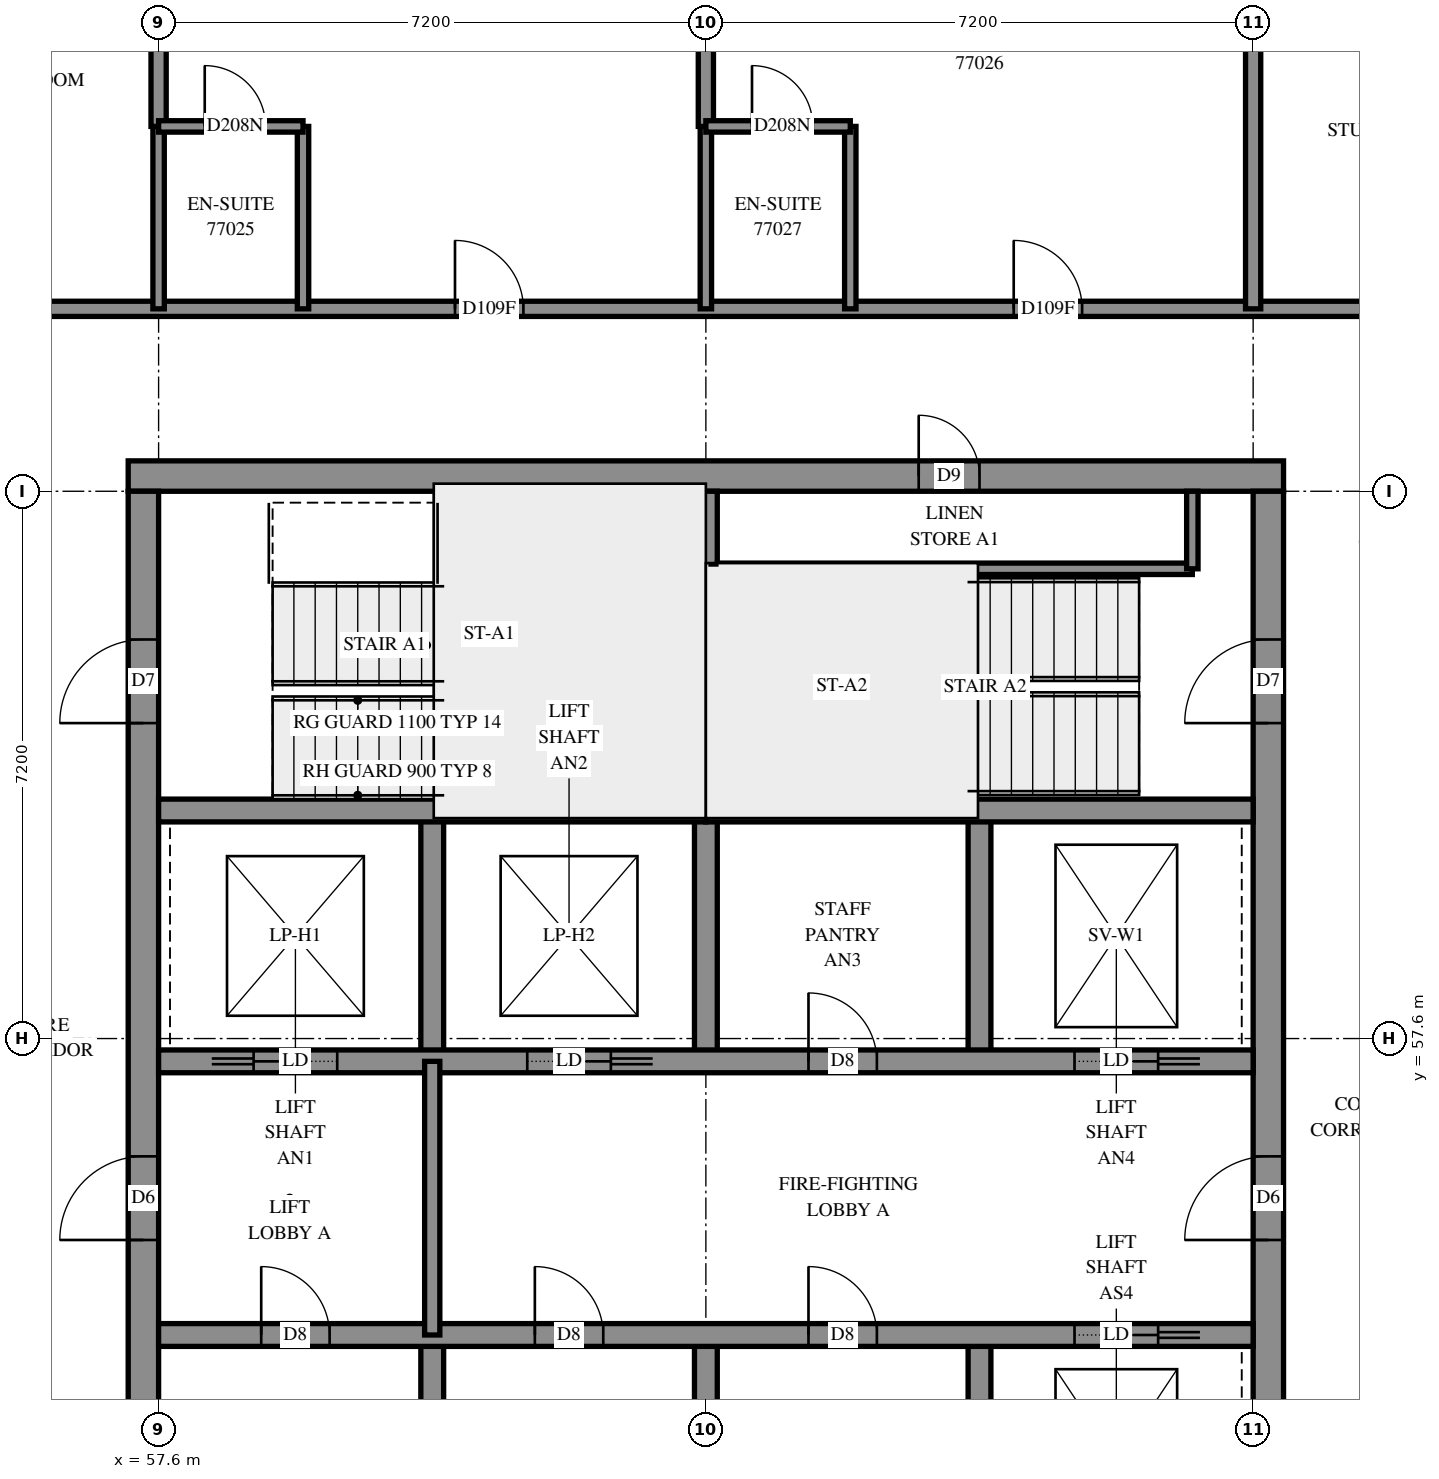
"""IFC4 building model, lengths in metres.
Left out: names, types, materials, properties, quantities, classifications, styles, units other than length and angle.
Written with IfcOpenShell. Run it as: python <this file> out.ifc"""

import sys

from ifc_helpers import new_model, si_unit, direction, frame, frame_2d, origin, place, context, subcontext, project, spatial, rectangle, extrude, element, fill, save


model = new_model("IFC4")
c1 = context("Model", 3, precision=1e-05, world=origin(), true_north=direction((0.0, 1.0)))
c2 = subcontext(c1, "Body", "Model", "MODEL_VIEW")
j1 = project(units=[si_unit("LENGTHUNIT", "METRE"), si_unit("PLANEANGLEUNIT", "RADIAN")], contexts=[c1])
p1 = place(None, origin())
s1 = spatial("IfcSite", under=j1, at=p1, CompositionType="ELEMENT")
p2 = place(p1, origin())
s2 = spatial("IfcBuilding", under=s1, at=p2, CompositionType="ELEMENT")
p3 = place(p2, frame((0.0, 0.0, 281.2)))
s3 = spatial("IfcBuildingStorey", under=s2, at=p3, CompositionType="ELEMENT", Elevation=281.2)
p4 = place(p3, frame((57.2, 65.0, -0.3), z_axis=(0.0, 0.0, 1.0), x_axis=(1.0, 0.0, 0.0)))
e1 = element("IfcWall", 1, at=p4, inside=s3, PredefinedType="SHEAR", context=c2, shape_type="SweptSolid", body=[
    extrude(rectangle(XDim=15.2, YDim=0.4, at=frame_2d((7.6, 0.0))), origin(), (0.0, 0.0, 1.0), 2.7),
])
p5 = place(p4, frame((10.4, 0.0, 0.3)))
e2 = element("IfcOpeningElement", 2, at=p5, cuts=e1, PredefinedType="OPENING", context=c2, shape_type="SweptSolid", body=[
    extrude(rectangle(XDim=0.8, YDim=2.1, at=frame_2d((0.4, 1.05))), frame((0.0, 0.21, 0.0), z_axis=(0.0, -1.0, 0.0), x_axis=(1.0, 0.0, 0.0)), (0.0, 0.0, 1.0), 0.42),
])
p6 = place(p3, frame((57.4, 50.4, -0.3), z_axis=(0.0, 0.0, 1.0), x_axis=(0.0, 1.0, 0.0)))
e3 = element("IfcWall", 3, at=p6, inside=s3, PredefinedType="SHEAR", context=c2, shape_type="SweptSolid", body=[
    extrude(rectangle(XDim=14.4, YDim=0.4, at=frame_2d((7.2, 0.0))), origin(), (0.0, 0.0, 1.0), 2.7),
])
p7 = place(p6, frame((4.55, 0.0, 0.3)))
e4 = element("IfcOpeningElement", 4, at=p7, cuts=e3, PredefinedType="OPENING", context=c2, shape_type="SweptSolid", body=[
    extrude(rectangle(XDim=1.1, YDim=2.1, at=frame_2d((0.55, 1.05))), frame((0.0, 0.21, 0.0), z_axis=(0.0, -1.0, 0.0), x_axis=(1.0, 0.0, 0.0)), (0.0, 0.0, 1.0), 0.42),
])
p8 = place(p6, frame((11.35, 0.0, 0.3)))
e5 = element("IfcOpeningElement", 5, at=p8, cuts=e3, PredefinedType="OPENING", context=c2, shape_type="SweptSolid", body=[
    extrude(rectangle(XDim=1.1, YDim=2.1, at=frame_2d((0.55, 1.05))), frame((0.0, 0.21, 0.0), z_axis=(0.0, -1.0, 0.0), x_axis=(1.0, 0.0, 0.0)), (0.0, 0.0, 1.0), 0.42),
])
p9 = place(p3, frame((72.2, 50.4, -0.3), z_axis=(0.0, 0.0, 1.0), x_axis=(0.0, 1.0, 0.0)))
e6 = element("IfcWall", 6, at=p9, inside=s3, PredefinedType="SHEAR", context=c2, shape_type="SweptSolid", body=[
    extrude(rectangle(XDim=14.4, YDim=0.4, at=frame_2d((7.2, 0.0))), origin(), (0.0, 0.0, 1.0), 2.7),
])
p10 = place(p9, frame((4.55, 0.0, 0.3)))
e7 = element("IfcOpeningElement", 7, at=p10, cuts=e6, PredefinedType="OPENING", context=c2, shape_type="SweptSolid", body=[
    extrude(rectangle(XDim=1.1, YDim=2.1, at=frame_2d((0.55, 1.05))), frame((0.0, 0.21, 0.0), z_axis=(0.0, -1.0, 0.0), x_axis=(1.0, 0.0, 0.0)), (0.0, 0.0, 1.0), 0.42),
])
p11 = place(p9, frame((11.35, 0.0, 0.3)))
e8 = element("IfcOpeningElement", 8, at=p11, cuts=e6, PredefinedType="OPENING", context=c2, shape_type="SweptSolid", body=[
    extrude(rectangle(XDim=1.1, YDim=2.1, at=frame_2d((0.55, 1.05))), frame((0.0, 0.21, 0.0), z_axis=(0.0, -1.0, 0.0), x_axis=(1.0, 0.0, 0.0)), (0.0, 0.0, 1.0), 0.42),
])
for number, where, z_axis, x_axis in (
    (9, (61.2, 50.4, 0.0), (0.0, 0.0, 1.0), (0.0, 1.0, 0.0)),
    (10, (61.2, 57.3, 0.0), (0.0, 0.0, 1.0), (0.0, 1.0, 0.0)),
    (11, (64.8, 50.4, 0.0), (0.0, 0.0, 1.0), (0.0, 1.0, 0.0)),
    (12, (64.8, 57.3, 0.0), (0.0, 0.0, 1.0), (0.0, 1.0, 0.0)),
    (13, (68.4, 50.4, 0.0), (0.0, 0.0, 1.0), (0.0, 1.0, 0.0)),
    (14, (68.4, 57.3, 0.0), (0.0, 0.0, 1.0), (0.0, 1.0, 0.0)),
):
    element("IfcWall", number, at=place(p3, frame(where, z_axis=z_axis, x_axis=x_axis)), inside=s3, PredefinedType="SOLIDWALL", context=c2, shape_type="SweptSolid", body=[
        extrude(rectangle(XDim=3.3, YDim=0.3, at=frame_2d((1.65, 0.0))), origin(), (0.0, 0.0, 1.0), 3.1),
    ])
p12 = place(p3, frame((57.6, 53.7, 0.0), z_axis=(0.0, 0.0, 1.0), x_axis=(1.0, 0.0, 0.0)))
e15 = element("IfcWall", 15, at=p12, inside=s3, PredefinedType="SOLIDWALL", context=c2, shape_type="SweptSolid", body=[
    extrude(rectangle(XDim=14.4, YDim=0.3, at=frame_2d((7.2, 0.0))), origin(), (0.0, 0.0, 1.0), 3.1),
])
p13 = place(p12, frame((1.35, 0.0, 0.0)))
e16 = element("IfcOpeningElement", 16, at=p13, cuts=e15, PredefinedType="OPENING", context=c2, shape_type="SweptSolid", body=[
    extrude(rectangle(XDim=0.9, YDim=2.1, at=frame_2d((0.45, 1.05))), frame((0.0, 0.16, 0.0), z_axis=(0.0, -1.0, 0.0), x_axis=(1.0, 0.0, 0.0)), (0.0, 0.0, 1.0), 0.32),
])
p14 = place(p12, frame((4.95, 0.0, 0.0)))
e17 = element("IfcOpeningElement", 17, at=p14, cuts=e15, PredefinedType="OPENING", context=c2, shape_type="SweptSolid", body=[
    extrude(rectangle(XDim=0.9, YDim=2.1, at=frame_2d((0.45, 1.05))), frame((0.0, 0.16, 0.0), z_axis=(0.0, -1.0, 0.0), x_axis=(1.0, 0.0, 0.0)), (0.0, 0.0, 1.0), 0.32),
])
p15 = place(p12, frame((8.55, 0.0, 0.0)))
e18 = element("IfcOpeningElement", 18, at=p15, cuts=e15, PredefinedType="OPENING", context=c2, shape_type="SweptSolid", body=[
    extrude(rectangle(XDim=0.9, YDim=2.1, at=frame_2d((0.45, 1.05))), frame((0.0, 0.16, 0.0), z_axis=(0.0, -1.0, 0.0), x_axis=(1.0, 0.0, 0.0)), (0.0, 0.0, 1.0), 0.32),
])
p16 = place(p12, frame((12.05, 0.0, 0.0)))
e19 = element("IfcOpeningElement", 19, at=p16, cuts=e15, PredefinedType="OPENING", context=c2, shape_type="SweptSolid", body=[
    extrude(rectangle(XDim=1.1, YDim=2.1, at=frame_2d((0.55, 1.05))), frame((0.0, 0.16, 0.0), z_axis=(0.0, -1.0, 0.0), x_axis=(1.0, 0.0, 0.0)), (0.0, 0.0, 1.0), 0.32),
])
p17 = place(p3, frame((57.6, 57.3, 0.0), z_axis=(0.0, 0.0, 1.0), x_axis=(1.0, 0.0, 0.0)))
e20 = element("IfcWall", 20, at=p17, inside=s3, PredefinedType="SOLIDWALL", context=c2, shape_type="SweptSolid", body=[
    extrude(rectangle(XDim=14.4, YDim=0.3, at=frame_2d((7.2, 0.0))), origin(), (0.0, 0.0, 1.0), 3.1),
])
p18 = place(p17, frame((8.55, 0.0, 0.0)))
e21 = element("IfcOpeningElement", 21, at=p18, cuts=e20, PredefinedType="OPENING", context=c2, shape_type="SweptSolid", body=[
    extrude(rectangle(XDim=0.9, YDim=2.1, at=frame_2d((0.45, 1.05))), frame((0.0, 0.16, 0.0), z_axis=(0.0, -1.0, 0.0), x_axis=(1.0, 0.0, 0.0)), (0.0, 0.0, 1.0), 0.32),
])
p19 = place(p17, frame((1.25, 0.0, 0.0)))
e22 = element("IfcOpeningElement", 22, at=p19, cuts=e20, PredefinedType="OPENING", context=c2, shape_type="SweptSolid", body=[
    extrude(rectangle(XDim=1.1, YDim=2.1, at=frame_2d((0.55, 1.05))), frame((0.0, 0.16, 0.0), z_axis=(0.0, -1.0, 0.0), x_axis=(1.0, 0.0, 0.0)), (0.0, 0.0, 1.0), 0.32),
])
p20 = place(p17, frame((4.85, 0.0, 0.0)))
e23 = element("IfcOpeningElement", 23, at=p20, cuts=e20, PredefinedType="OPENING", context=c2, shape_type="SweptSolid", body=[
    extrude(rectangle(XDim=1.1, YDim=2.1, at=frame_2d((0.55, 1.05))), frame((0.0, 0.16, 0.0), z_axis=(0.0, -1.0, 0.0), x_axis=(1.0, 0.0, 0.0)), (0.0, 0.0, 1.0), 0.32),
])
p21 = place(p17, frame((12.05, 0.0, 0.0)))
e24 = element("IfcOpeningElement", 24, at=p21, cuts=e20, PredefinedType="OPENING", context=c2, shape_type="SweptSolid", body=[
    extrude(rectangle(XDim=1.1, YDim=2.1, at=frame_2d((0.55, 1.05))), frame((0.0, 0.16, 0.0), z_axis=(0.0, -1.0, 0.0), x_axis=(1.0, 0.0, 0.0)), (0.0, 0.0, 1.0), 0.32),
])
for number, where, z_axis, x_axis in (
    (25, (57.6, 60.6, 0.0), (0.0, 0.0, 1.0), (1.0, 0.0, 0.0)),
    (26, (64.8, 60.6, 0.0), (0.0, 0.0, 1.0), (1.0, 0.0, 0.0)),
):
    element("IfcWall", number, at=place(p3, frame(where, z_axis=z_axis, x_axis=x_axis)), inside=s3, PredefinedType="SOLIDWALL", context=c2, shape_type="SweptSolid", body=[
        extrude(rectangle(XDim=7.2, YDim=0.3, at=frame_2d((3.6, 0.0))), origin(), (0.0, 0.0, 1.0), 3.1),
    ])
p22 = place(p3, frame((64.8, 60.6, 0.0), z_axis=(0.0, 0.0, 1.0), x_axis=(0.0, 1.0, 0.0)))
e27 = element("IfcWall", 27, at=p22, inside=s3, PredefinedType="SOLIDWALL", context=c2, shape_type="SweptSolid", body=[
    extrude(rectangle(XDim=4.2, YDim=0.3, at=frame_2d((2.1, 0.0))), origin(), (0.0, 0.0, 1.0), 3.1),
])
p23 = place(p3, frame((64.95, 63.78, 0.0), z_axis=(0.0, 0.0, 1.0), x_axis=(1.0, 0.0, 0.0)))
e28 = element("IfcWall", 28, at=p23, inside=s3, PredefinedType="PARTITIONING", context=c2, shape_type="SweptSolid", body=[
    extrude(rectangle(XDim=6.25, YDim=0.15, at=frame_2d((3.125, 0.0))), origin(), (0.0, 0.0, 1.0), 3.1),
])
p24 = place(p3, frame((71.2, 63.78, 0.0), z_axis=(0.0, 0.0, 1.0), x_axis=(0.0, 1.0, 0.0)))
e29 = element("IfcWall", 29, at=p24, inside=s3, PredefinedType="PARTITIONING", context=c2, shape_type="SweptSolid", body=[
    extrude(rectangle(XDim=1.02, YDim=0.15, at=frame_2d((0.51, 0.0))), origin(), (0.0, 0.0, 1.0), 3.1),
])
p25 = place(p3, frame((61.2, 53.7, 0.0), z_axis=(0.0, 0.0, 1.0), x_axis=(0.0, 1.0, 0.0)))
e30 = element("IfcWall", 30, at=p25, inside=s3, PredefinedType="PARTITIONING", context=c2, shape_type="SweptSolid", body=[
    extrude(rectangle(XDim=3.6, YDim=0.2, at=frame_2d((1.8, 0.0))), origin(), (0.0, 0.0, 1.0), 3.1),
])
p26 = place(p3, frame((55.2, 67.2, 0.0), z_axis=(0.0, 0.0, 1.0), x_axis=(1.0, 0.0, 0.0)))
e31 = element("IfcWall", 31, at=p26, inside=s3, PredefinedType="PARTITIONING", context=c2, shape_type="SweptSolid", body=[
    extrude(rectangle(XDim=19.2, YDim=0.2, at=frame_2d((9.6, 0.0))), origin(), (0.0, 0.0, 1.0), 3.1),
])
p27 = place(p26, frame((6.299, 0.0, 0.0)))
e32 = element("IfcOpeningElement", 32, at=p27, cuts=e31, PredefinedType="OPENING", context=c2, shape_type="SweptSolid", body=[
    extrude(rectangle(XDim=0.9, YDim=2.1, at=frame_2d((0.45, 1.05))), frame((0.0, 0.11, 0.0), z_axis=(0.0, -1.0, 0.0), x_axis=(1.0, 0.0, 0.0)), (0.0, 0.0, 1.0), 0.22),
])
p28 = place(p26, frame((13.65, 0.0, 0.0)))
e33 = element("IfcOpeningElement", 33, at=p28, cuts=e31, PredefinedType="OPENING", context=c2, shape_type="SweptSolid", body=[
    extrude(rectangle(XDim=0.9, YDim=2.1, at=frame_2d((0.45, 1.05))), frame((0.0, 0.11, 0.0), z_axis=(0.0, -1.0, 0.0), x_axis=(1.0, 0.0, 0.0)), (0.0, 0.0, 1.0), 0.22),
])
p29 = place(p3, frame((72.0, 67.2, 0.0), z_axis=(0.0, 0.0, 1.0), x_axis=(0.0, 1.0, 0.0)))
e34 = element("IfcWall", 34, at=p29, inside=s3, PredefinedType="PARTITIONING", context=c2, shape_type="SweptSolid", body=[
    extrude(rectangle(XDim=4.346, YDim=0.2, at=frame_2d((2.173, 0.0))), origin(), (0.0, 0.0, 1.0), 3.1),
])
for number, where, z_axis, x_axis in (
    (35, (57.6, 67.2, 0.0), (0.0, 0.0, 1.0), (0.0, 1.0, 0.0)),
    (36, (59.5, 67.2, 0.0), (0.0, 0.0, 1.0), (0.0, 1.0, 0.0)),
    (37, (64.8, 67.2, 0.0), (0.0, 0.0, 1.0), (0.0, 1.0, 0.0)),
    (38, (66.7, 67.2, 0.0), (0.0, 0.0, 1.0), (0.0, 1.0, 0.0)),
):
    element("IfcWall", number, at=place(p3, frame(where, z_axis=z_axis, x_axis=x_axis)), inside=s3, PredefinedType="PARTITIONING", context=c2, shape_type="SweptSolid", body=[
        extrude(rectangle(XDim=2.4, YDim=0.15, at=frame_2d((1.2, 0.0))), origin(), (0.0, 0.0, 1.0), 3.1),
    ])
for number, where, z_axis, x_axis in (
    (39, (57.6, 69.6, 0.0), (0.0, 0.0, 1.0), (0.0, 1.0, 0.0)),
    (40, (64.8, 69.6, 0.0), (0.0, 0.0, 1.0), (0.0, 1.0, 0.0)),
):
    element("IfcWall", number, at=place(p3, frame(where, z_axis=z_axis, x_axis=x_axis)), inside=s3, PredefinedType="PARTITIONING", context=c2, shape_type="SweptSolid", body=[
        extrude(rectangle(XDim=2.05, YDim=0.2, at=frame_2d((1.025, 0.0))), origin(), (0.0, 0.0, 1.0), 3.1),
    ])
p30 = place(p3, frame((64.8, 69.6, 0.0), z_axis=(0.0, 0.0, 1.0), x_axis=(1.0, 0.0, 0.0)))
e41 = element("IfcWall", 41, at=p30, inside=s3, PredefinedType="PARTITIONING", context=c2, shape_type="SweptSolid", body=[
    extrude(rectangle(XDim=1.9, YDim=0.15, at=frame_2d((0.95, 0.0))), origin(), (0.0, 0.0, 1.0), 3.1),
])
p31 = place(p30, frame((0.607, 0.0, 0.0)))
e42 = element("IfcOpeningElement", 42, at=p31, cuts=e41, PredefinedType="OPENING", context=c2, shape_type="SweptSolid", body=[
    extrude(rectangle(XDim=0.8, YDim=2.1, at=frame_2d((0.4, 1.05))), frame((0.0, 0.085, 0.0), z_axis=(0.0, -1.0, 0.0), x_axis=(1.0, 0.0, 0.0)), (0.0, 0.0, 1.0), 0.17),
])
p32 = place(p3, frame((57.6, 69.6, 0.0), z_axis=(0.0, 0.0, 1.0), x_axis=(1.0, 0.0, 0.0)))
e43 = element("IfcWall", 43, at=p32, inside=s3, PredefinedType="PARTITIONING", context=c2, shape_type="SweptSolid", body=[
    extrude(rectangle(XDim=1.9, YDim=0.15, at=frame_2d((0.95, 0.0))), origin(), (0.0, 0.0, 1.0), 3.1),
])
p33 = place(p32, frame((0.607, 0.0, 0.0)))
e44 = element("IfcOpeningElement", 44, at=p33, cuts=e43, PredefinedType="OPENING", context=c2, shape_type="SweptSolid", body=[
    extrude(rectangle(XDim=0.8, YDim=2.1, at=frame_2d((0.4, 1.05))), frame((0.0, 0.085, 0.0), z_axis=(0.0, -1.0, 0.0), x_axis=(1.0, 0.0, 0.0)), (0.0, 0.0, 1.0), 0.17),
])
p34 = place(p5, origin())
e45 = element("IfcDoor", 45, at=p34, inside=s3, OperationType="SINGLE_SWING_RIGHT", PredefinedType="DOOR", context=c2, shape_type="SweptSolid", body=[
    extrude(rectangle(XDim=0.8, YDim=2.1, at=frame_2d((0.4, 1.05))), frame((0.0, 0.025, 0.0), z_axis=(0.0, -1.0, 0.0), x_axis=(1.0, 0.0, 0.0)), (0.0, 0.0, 1.0), 0.05),
])
fill(e2, e45)
p35 = place(p7, origin())
e46 = element("IfcDoor", 46, at=p35, inside=s3, OperationType="DOUBLE_DOOR_SINGLE_SWING", PredefinedType="DOOR", context=c2, shape_type="SweptSolid", body=[
    extrude(rectangle(XDim=1.1, YDim=2.1, at=frame_2d((0.55, 1.05))), frame((0.0, 0.025, 0.0), z_axis=(0.0, -1.0, 0.0), x_axis=(1.0, 0.0, 0.0)), (0.0, 0.0, 1.0), 0.05),
])
fill(e4, e46)
p36 = place(p10, origin())
e47 = element("IfcDoor", 47, at=p36, inside=s3, OperationType="DOUBLE_DOOR_SINGLE_SWING", PredefinedType="DOOR", context=c2, shape_type="SweptSolid", body=[
    extrude(rectangle(XDim=1.1, YDim=2.1, at=frame_2d((0.55, 1.05))), frame((0.0, 0.025, 0.0), z_axis=(0.0, -1.0, 0.0), x_axis=(1.0, 0.0, 0.0)), (0.0, 0.0, 1.0), 0.05),
])
fill(e7, e47)
p37 = place(p8, origin())
e48 = element("IfcDoor", 48, at=p37, inside=s3, OperationType="SINGLE_SWING_LEFT", PredefinedType="DOOR", context=c2, shape_type="SweptSolid", body=[
    extrude(rectangle(XDim=1.1, YDim=2.1, at=frame_2d((0.55, 1.05))), frame((0.0, 0.025, 0.0), z_axis=(0.0, -1.0, 0.0), x_axis=(1.0, 0.0, 0.0)), (0.0, 0.0, 1.0), 0.05),
])
fill(e5, e48)
p38 = place(p11, origin())
e49 = element("IfcDoor", 49, at=p38, inside=s3, OperationType="SINGLE_SWING_RIGHT", PredefinedType="DOOR", context=c2, shape_type="SweptSolid", body=[
    extrude(rectangle(XDim=1.1, YDim=2.1, at=frame_2d((0.55, 1.05))), frame((0.0, 0.025, 0.0), z_axis=(0.0, -1.0, 0.0), x_axis=(1.0, 0.0, 0.0)), (0.0, 0.0, 1.0), 0.05),
])
fill(e8, e49)
p39 = place(p13, origin())
e50 = element("IfcDoor", 50, at=p39, inside=s3, OperationType="SINGLE_SWING_LEFT", PredefinedType="DOOR", context=c2, shape_type="SweptSolid", body=[
    extrude(rectangle(XDim=0.9, YDim=2.1, at=frame_2d((0.45, 1.05))), frame((0.0, 0.025, 0.0), z_axis=(0.0, -1.0, 0.0), x_axis=(1.0, 0.0, 0.0)), (0.0, 0.0, 1.0), 0.05),
])
fill(e16, e50)
p40 = place(p14, origin())
e51 = element("IfcDoor", 51, at=p40, inside=s3, OperationType="SINGLE_SWING_LEFT", PredefinedType="DOOR", context=c2, shape_type="SweptSolid", body=[
    extrude(rectangle(XDim=0.9, YDim=2.1, at=frame_2d((0.45, 1.05))), frame((0.0, 0.025, 0.0), z_axis=(0.0, -1.0, 0.0), x_axis=(1.0, 0.0, 0.0)), (0.0, 0.0, 1.0), 0.05),
])
fill(e17, e51)
p41 = place(p15, origin())
e52 = element("IfcDoor", 52, at=p41, inside=s3, OperationType="SINGLE_SWING_LEFT", PredefinedType="DOOR", context=c2, shape_type="SweptSolid", body=[
    extrude(rectangle(XDim=0.9, YDim=2.1, at=frame_2d((0.45, 1.05))), frame((0.0, 0.025, 0.0), z_axis=(0.0, -1.0, 0.0), x_axis=(1.0, 0.0, 0.0)), (0.0, 0.0, 1.0), 0.05),
])
fill(e18, e52)
p42 = place(p18, origin())
e53 = element("IfcDoor", 53, at=p42, inside=s3, OperationType="SINGLE_SWING_LEFT", PredefinedType="DOOR", context=c2, shape_type="SweptSolid", body=[
    extrude(rectangle(XDim=0.9, YDim=2.1, at=frame_2d((0.45, 1.05))), frame((0.0, 0.025, 0.0), z_axis=(0.0, -1.0, 0.0), x_axis=(1.0, 0.0, 0.0)), (0.0, 0.0, 1.0), 0.05),
])
fill(e21, e53)
p43 = place(p16, origin())
e54 = element("IfcDoor", 54, at=p43, inside=s3, OperationType="SLIDING_TO_RIGHT", PredefinedType="DOOR", context=c2, shape_type="SweptSolid", body=[
    extrude(rectangle(XDim=1.1, YDim=2.1, at=frame_2d((0.55, 1.05))), frame((0.0, 0.025, 0.0), z_axis=(0.0, -1.0, 0.0), x_axis=(1.0, 0.0, 0.0)), (0.0, 0.0, 1.0), 0.05),
])
fill(e19, e54)
p44 = place(p19, origin())
e55 = element("IfcDoor", 55, at=p44, inside=s3, OperationType="SLIDING_TO_LEFT", PredefinedType="DOOR", context=c2, shape_type="SweptSolid", body=[
    extrude(rectangle(XDim=1.1, YDim=2.1, at=frame_2d((0.55, 1.05))), frame((0.0, 0.025, 0.0), z_axis=(0.0, -1.0, 0.0), x_axis=(1.0, 0.0, 0.0)), (0.0, 0.0, 1.0), 0.05),
])
fill(e22, e55)
p45 = place(p20, origin())
e56 = element("IfcDoor", 56, at=p45, inside=s3, OperationType="SLIDING_TO_RIGHT", PredefinedType="DOOR", context=c2, shape_type="SweptSolid", body=[
    extrude(rectangle(XDim=1.1, YDim=2.1, at=frame_2d((0.55, 1.05))), frame((0.0, 0.025, 0.0), z_axis=(0.0, -1.0, 0.0), x_axis=(1.0, 0.0, 0.0)), (0.0, 0.0, 1.0), 0.05),
])
fill(e23, e56)
p46 = place(p21, origin())
e57 = element("IfcDoor", 57, at=p46, inside=s3, OperationType="SLIDING_TO_RIGHT", PredefinedType="DOOR", context=c2, shape_type="SweptSolid", body=[
    extrude(rectangle(XDim=1.1, YDim=2.1, at=frame_2d((0.55, 1.05))), frame((0.0, 0.025, 0.0), z_axis=(0.0, -1.0, 0.0), x_axis=(1.0, 0.0, 0.0)), (0.0, 0.0, 1.0), 0.05),
])
fill(e24, e57)
p47 = place(p27, origin())
e58 = element("IfcDoor", 58, at=p47, inside=s3, OperationType="SINGLE_SWING_RIGHT", PredefinedType="DOOR", context=c2, shape_type="SweptSolid", body=[
    extrude(rectangle(XDim=0.9, YDim=2.1, at=frame_2d((0.45, 1.05))), frame((0.0, 0.025, 0.0), z_axis=(0.0, -1.0, 0.0), x_axis=(1.0, 0.0, 0.0)), (0.0, 0.0, 1.0), 0.05),
])
fill(e32, e58)
p48 = place(p33, origin())
e59 = element("IfcDoor", 59, at=p48, inside=s3, OperationType="SINGLE_SWING_RIGHT", PredefinedType="DOOR", context=c2, shape_type="SweptSolid", body=[
    extrude(rectangle(XDim=0.8, YDim=2.1, at=frame_2d((0.4, 1.05))), frame((0.0, 0.025, 0.0), z_axis=(0.0, -1.0, 0.0), x_axis=(1.0, 0.0, 0.0)), (0.0, 0.0, 1.0), 0.05),
])
fill(e44, e59)
p49 = place(p28, origin())
e60 = element("IfcDoor", 60, at=p49, inside=s3, OperationType="SINGLE_SWING_RIGHT", PredefinedType="DOOR", context=c2, shape_type="SweptSolid", body=[
    extrude(rectangle(XDim=0.9, YDim=2.1, at=frame_2d((0.45, 1.05))), frame((0.0, 0.025, 0.0), z_axis=(0.0, -1.0, 0.0), x_axis=(1.0, 0.0, 0.0)), (0.0, 0.0, 1.0), 0.05),
])
fill(e33, e60)
p50 = place(p31, origin())
e61 = element("IfcDoor", 61, at=p50, inside=s3, OperationType="SINGLE_SWING_RIGHT", PredefinedType="DOOR", context=c2, shape_type="SweptSolid", body=[
    extrude(rectangle(XDim=0.8, YDim=2.1, at=frame_2d((0.4, 1.05))), frame((0.0, 0.025, 0.0), z_axis=(0.0, -1.0, 0.0), x_axis=(1.0, 0.0, 0.0)), (0.0, 0.0, 1.0), 0.05),
])
fill(e42, e61)
save(model, sys.argv[1])
